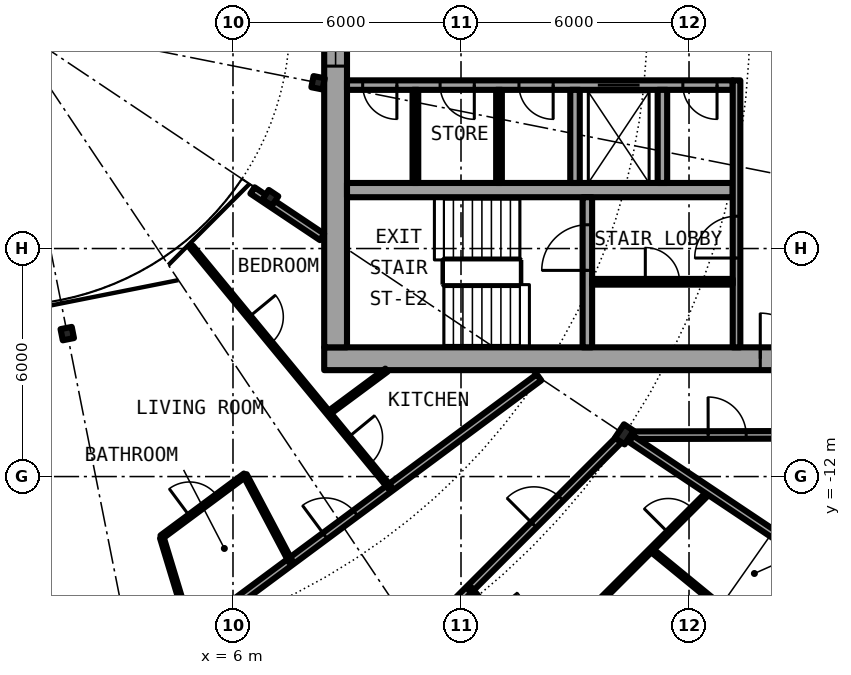
"""IFC4 building model, lengths in metres.
Left out: names, types, materials, properties, quantities, classifications, styles, units other than length and angle.
Written with IfcOpenShell. Run it as: python <this file> out.ifc"""

import sys

from ifc_helpers import new_model, si_unit, direction, frame, frame_2d, origin, origin_2d, place, context, subcontext, project, spatial, rectangle, i_section, extrude, element, fill, save


model = new_model("IFC4")
c1 = context("Model", 3, precision=1e-05, world=origin(), true_north=direction((0.0, 1.0)))
c2 = subcontext(c1, "Body", "Model", "MODEL_VIEW")
j1 = project(units=[si_unit("LENGTHUNIT", "METRE"), si_unit("PLANEANGLEUNIT", "RADIAN")], contexts=[c1])
p1 = place(None, origin())
s1 = spatial("IfcSite", under=j1, at=p1, CompositionType="ELEMENT")
p2 = place(p1, origin())
s2 = spatial("IfcBuilding", under=s1, at=p2, CompositionType="ELEMENT")
p3 = place(p2, frame((0.0, 0.0, 117.75)))
s3 = spatial("IfcBuildingStorey", under=s2, at=p3, CompositionType="ELEMENT", Elevation=117.75)
p4 = place(p3, frame((16.297, -10.889, 0.0), z_axis=(0.0, 0.0, 1.0), x_axis=(0.831469612303, -0.55557023302, 0.0)))
e1 = element("IfcColumn", 1, at=p4, inside=s3, PredefinedType="COLUMN", context=c2, shape_type="SweptSolid", body=[
    extrude(i_section(OverallWidth=0.307, OverallDepth=0.432, WebThickness=0.021, FlangeThickness=0.04, FilletRadius=0.027, at=origin_2d()), origin(), (0.0, 0.0, 1.0), 3.05),
])
for number, where, z_axis, x_axis in (
    (2, (1.639, -8.239, 0.0), (0.0, 0.0, 1.0), (0.195, -0.981, 0.0)),
    (3, (6.984, -4.667, 0.0), (0.0, 0.0, 1.0), (0.831, -0.556, 0.0)),
    (4, (8.239, -1.639, 0.0), (0.0, 0.0, 1.0), (0.981, -0.195, 0.0)),
):
    element("IfcColumn", number, at=place(p3, frame(where, z_axis=z_axis, x_axis=x_axis)), inside=s3, PredefinedType="COLUMN", context=c2, shape_type="SweptSolid", body=[
        extrude(i_section(OverallWidth=0.3, OverallDepth=0.3, WebThickness=0.011, FlangeThickness=0.019, FilletRadius=0.027, at=origin_2d()), origin(), (0.0, 0.0, 1.0), 3.05),
    ])
p5 = place(p3, frame((19.304, -19.304, 0.0), z_axis=(0.0, 0.0, 1.0), x_axis=(0.634382322723, 0.773019449054, 0.0)))
e5 = element("IfcWall", 5, at=p5, inside=s3, PredefinedType="SOLIDWALL", context=c2, shape_type="SweptSolid", body=[
    extrude(rectangle(XDim=5.352, YDim=0.25, at=frame_2d((2.676, 0.0))), origin(), (0.0, 0.0, 1.0), 2.7),
])
p6 = place(p5, frame((0.441, 0.0, 0.3)))
e6 = element("IfcOpeningElement", 6, at=p6, cuts=e5, PredefinedType="OPENING", context=c2, shape_type="SweptSolid", body=[
    extrude(rectangle(XDim=1.8, YDim=2.1, at=frame_2d((0.9, 1.05))), frame((0.0, 0.135, 0.0), z_axis=(0.0, -1.0, 0.0), x_axis=(1.0, 0.0, 0.0)), (0.0, 0.0, 1.0), 0.27),
])
p7 = place(p5, frame((3.51, 0.0, 0.0)))
e7 = element("IfcOpeningElement", 7, at=p7, cuts=e5, PredefinedType="OPENING", context=c2, shape_type="SweptSolid", body=[
    extrude(rectangle(XDim=1.0, YDim=2.2, at=frame_2d((0.5, 1.1))), frame((0.0, 0.135, 0.0), z_axis=(0.0, -1.0, 0.0), x_axis=(1.0, 0.0, 0.0)), (0.0, 0.0, 1.0), 0.27),
])
p8 = place(p3, frame((8.4, -8.9, 0.0), z_axis=(0.0, 0.0, 1.0), x_axis=(1.0, 0.0, 0.0)))
e8 = element("IfcWall", 8, at=p8, inside=s3, PredefinedType="SHEAR", context=c2, shape_type="SweptSolid", body=[
    extrude(rectangle(XDim=13.8, YDim=0.6, at=frame_2d((6.9, 0.0))), origin(), (0.0, 0.0, 1.0), 3.05),
])
p9 = place(p8, frame((11.475, 0.0, 0.0)))
e9 = element("IfcOpeningElement", 9, at=p9, cuts=e8, PredefinedType="OPENING", context=c2, shape_type="SweptSolid", body=[
    extrude(rectangle(XDim=1.2, YDim=2.3, at=frame_2d((0.6, 1.15))), frame((0.0, 0.31, 0.0), z_axis=(0.0, -1.0, 0.0), x_axis=(1.0, 0.0, 0.0)), (0.0, 0.0, 1.0), 0.62),
])
p10 = place(p3, frame((8.7, -8.6, 0.0), z_axis=(0.0, 0.0, 1.0), x_axis=(0.0, 1.0, 0.0)))
e10 = element("IfcWall", 10, at=p10, inside=s3, PredefinedType="SHEAR", context=c2, shape_type="SweptSolid", body=[
    extrude(rectangle(XDim=17.2, YDim=0.6, at=frame_2d((8.6, 0.0))), origin(), (0.0, 0.0, 1.0), 3.05),
])
p11 = place(p10, frame((7.4, 0.0, 0.1)))
e11 = element("IfcOpeningElement", 11, at=p11, cuts=e10, PredefinedType="OPENING", context=c2, shape_type="SweptSolid", body=[
    extrude(rectangle(XDim=2.4, YDim=2.2, at=frame_2d((1.2, 1.1))), frame((0.0, 0.31, 0.0), z_axis=(0.0, -1.0, 0.0), x_axis=(1.0, 0.0, 0.0)), (0.0, 0.0, 1.0), 0.62),
])
p12 = place(p3, frame((19.15, -1.7, 0.0), z_axis=(0.0, 0.0, 1.0), x_axis=(-1.0, 0.0, 0.0)))
e12 = element("IfcWall", 12, at=p12, inside=s3, PredefinedType="SHEAR", context=c2, shape_type="SweptSolid", body=[
    extrude(rectangle(XDim=10.15, YDim=0.25, at=frame_2d((5.075, 0.0))), origin(), (0.0, 0.0, 1.0), 3.05),
])
p13 = place(p12, frame((2.45, 0.0, 0.0)))
e13 = element("IfcOpeningElement", 13, at=p13, cuts=e12, PredefinedType="OPENING", context=c2, shape_type="SweptSolid", body=[
    extrude(rectangle(XDim=1.1, YDim=2.3, at=frame_2d((0.55, 1.15))), frame((0.0, 0.135, 0.0), z_axis=(0.0, -1.0, 0.0), x_axis=(1.0, 0.0, 0.0)), (0.0, 0.0, 1.0), 0.27),
])
p14 = place(p12, frame((8.837, 0.0, 0.0)))
e14 = element("IfcOpeningElement", 14, at=p14, cuts=e12, PredefinedType="OPENING", context=c2, shape_type="SweptSolid", body=[
    extrude(rectangle(XDim=0.9, YDim=2.3, at=frame_2d((0.45, 1.15))), frame((0.0, 0.135, 0.0), z_axis=(0.0, -1.0, 0.0), x_axis=(1.0, 0.0, 0.0)), (0.0, 0.0, 1.0), 0.27),
])
p15 = place(p12, frame((6.8, 0.0, 0.0)))
e15 = element("IfcOpeningElement", 15, at=p15, cuts=e12, PredefinedType="OPENING", context=c2, shape_type="SweptSolid", body=[
    extrude(rectangle(XDim=0.9, YDim=2.3, at=frame_2d((0.45, 1.15))), frame((0.0, 0.135, 0.0), z_axis=(0.0, -1.0, 0.0), x_axis=(1.0, 0.0, 0.0)), (0.0, 0.0, 1.0), 0.27),
])
p16 = place(p12, frame((4.725, 0.0, 0.0)))
e16 = element("IfcOpeningElement", 16, at=p16, cuts=e12, PredefinedType="OPENING", context=c2, shape_type="SweptSolid", body=[
    extrude(rectangle(XDim=0.9, YDim=2.3, at=frame_2d((0.45, 1.15))), frame((0.0, 0.135, 0.0), z_axis=(0.0, -1.0, 0.0), x_axis=(1.0, 0.0, 0.0)), (0.0, 0.0, 1.0), 0.27),
])
p17 = place(p12, frame((0.413, 0.0, 0.0)))
e17 = element("IfcOpeningElement", 17, at=p17, cuts=e12, PredefinedType="OPENING", context=c2, shape_type="SweptSolid", body=[
    extrude(rectangle(XDim=0.9, YDim=2.3, at=frame_2d((0.45, 1.15))), frame((0.0, 0.135, 0.0), z_axis=(0.0, -1.0, 0.0), x_axis=(1.0, 0.0, 0.0)), (0.0, 0.0, 1.0), 0.27),
])
p18 = place(p3, frame((9.0, -4.462, 0.0), z_axis=(0.0, 0.0, 1.0), x_axis=(1.0, 0.0, 0.0)))
e18 = element("IfcWall", 18, at=p18, inside=s3, PredefinedType="SHEAR", context=c2, shape_type="SweptSolid", body=[
    extrude(rectangle(XDim=10.15, YDim=0.375, at=frame_2d((5.075, 0.0))), origin(), (0.0, 0.0, 1.0), 3.05),
])
p19 = place(p3, frame((15.325, -8.6, 0.0), z_axis=(0.0, 0.0, 1.0), x_axis=(0.0, 1.0, 0.0)))
e19 = element("IfcWall", 19, at=p19, inside=s3, PredefinedType="SHEAR", context=c2, shape_type="SweptSolid", body=[
    extrude(rectangle(XDim=3.95, YDim=0.25, at=frame_2d((1.975, 0.0))), origin(), (0.0, 0.0, 1.0), 3.05),
])
p20 = place(p19, frame((2.025, 0.0, 0.0)))
e20 = element("IfcOpeningElement", 20, at=p20, cuts=e19, PredefinedType="OPENING", context=c2, shape_type="SweptSolid", body=[
    extrude(rectangle(XDim=1.2, YDim=2.3, at=frame_2d((0.6, 1.15))), frame((0.0, 0.135, 0.0), z_axis=(0.0, -1.0, 0.0), x_axis=(1.0, 0.0, 0.0)), (0.0, 0.0, 1.0), 0.27),
])
for number, where, z_axis, x_axis in (
    (21, (15.0, -1.825, 0.0), (0.0, 0.0, 1.0), (0.0, -1.0, 0.0)),
    (22, (17.3, -1.825, 0.0), (0.0, 0.0, 1.0), (0.0, -1.0, 0.0)),
):
    element("IfcWall", number, at=place(p3, frame(where, z_axis=z_axis, x_axis=x_axis)), inside=s3, PredefinedType="SOLIDWALL", context=c2, shape_type="SweptSolid", body=[
        extrude(rectangle(XDim=2.45, YDim=0.25, at=frame_2d((1.225, 0.0))), origin(), (0.0, 0.0, 1.0), 2.7),
    ])
p21 = place(p3, frame((19.25, -8.6, 0.0), z_axis=(0.0, 0.0, 1.0), x_axis=(0.0, 1.0, 0.0)))
e23 = element("IfcWall", 23, at=p21, inside=s3, PredefinedType="SOLIDWALL", context=c2, shape_type="SweptSolid", body=[
    extrude(rectangle(XDim=7.025, YDim=0.2, at=frame_2d((3.513, 0.0))), origin(), (0.0, 0.0, 1.0), 2.7),
])
p22 = place(p21, frame((2.35, 0.0, 0.0)))
e24 = element("IfcOpeningElement", 24, at=p22, cuts=e23, PredefinedType="OPENING", context=c2, shape_type="SweptSolid", body=[
    extrude(rectangle(XDim=1.1, YDim=2.3, at=frame_2d((0.55, 1.15))), frame((0.0, 0.11, 0.0), z_axis=(0.0, -1.0, 0.0), x_axis=(1.0, 0.0, 0.0)), (0.0, 0.0, 1.0), 0.22),
])
for number, where, z_axis, x_axis in (
    (25, (10.8, -1.825, 0.0), (0.0, 0.0, 1.0), (0.0, -1.0, 0.0)),
    (26, (13.0, -1.825, 0.0), (0.0, 0.0, 1.0), (0.0, -1.0, 0.0)),
):
    element("IfcWall", number, at=place(p3, frame(where, z_axis=z_axis, x_axis=x_axis)), inside=s3, PredefinedType="PARTITIONING", context=c2, shape_type="SweptSolid", body=[
        extrude(rectangle(XDim=2.45, YDim=0.15, at=frame_2d((1.225, 0.0))), origin(), (0.0, 0.0, 1.0), 2.7),
    ])
p23 = place(p3, frame((15.45, -6.875, 0.0), z_axis=(0.0, 0.0, 1.0), x_axis=(1.0, 0.0, 0.0)))
e27 = element("IfcWall", 27, at=p23, inside=s3, PredefinedType="PARTITIONING", context=c2, shape_type="SweptSolid", body=[
    extrude(rectangle(XDim=3.7, YDim=0.15, at=frame_2d((1.85, 0.0))), origin(), (0.0, 0.0, 1.0), 2.7),
])
p24 = place(p23, frame((1.4, 0.0, 0.0)))
e28 = element("IfcOpeningElement", 28, at=p24, cuts=e27, PredefinedType="OPENING", context=c2, shape_type="SweptSolid", body=[
    extrude(rectangle(XDim=0.9, YDim=2.3, at=frame_2d((0.45, 1.15))), frame((0.0, 0.085, 0.0), z_axis=(0.0, -1.0, 0.0), x_axis=(1.0, 0.0, 0.0)), (0.0, 0.0, 1.0), 0.17),
])
p25 = place(p3, frame((15.468, -15.463, 0.0), z_axis=(0.0, 0.0, 1.0), x_axis=(0.707106781187, 0.707106781187, 0.0)))
e29 = element("IfcWall", 29, at=p25, inside=s3, PredefinedType="PARTITIONING", context=c2, shape_type="SweptSolid", body=[
    extrude(rectangle(XDim=4.351, YDim=0.1, at=frame_2d((2.176, 0.0))), origin(), (0.0, 0.0, 1.0), 2.7),
])
p26 = place(p25, frame((2.808, 0.0, 0.0)))
e30 = element("IfcOpeningElement", 30, at=p26, cuts=e29, PredefinedType="OPENING", context=c2, shape_type="SweptSolid", body=[
    extrude(rectangle(XDim=0.9, YDim=2.3, at=frame_2d((0.45, 1.15))), frame((0.0, 0.06, 0.0), z_axis=(0.0, -1.0, 0.0), x_axis=(1.0, 0.0, 0.0)), (0.0, 0.0, 1.0), 0.12),
])
p27 = place(p3, frame((11.0, -16.186, 0.0), z_axis=(0.0, 0.0, 1.0), x_axis=(0.707106781187, 0.707106781187, 0.0)))
e31 = element("IfcWall", 31, at=p27, inside=s3, PredefinedType="PARTITIONING", context=c2, shape_type="SweptSolid", body=[
    extrude(rectangle(XDim=7.334, YDim=0.2, at=frame_2d((3.667, 0.0))), origin(), (0.0, 0.0, 1.0), 2.39),
])
p28 = place(p27, frame((4.123, 0.0, 0.0)))
e32 = element("IfcOpeningElement", 32, at=p28, cuts=e31, PredefinedType="OPENING", context=c2, shape_type="SweptSolid", body=[
    extrude(rectangle(XDim=1.0, YDim=2.3, at=frame_2d((0.5, 1.15))), frame((0.0, 0.11, 0.0), z_axis=(0.0, -1.0, 0.0), x_axis=(1.0, 0.0, 0.0)), (0.0, 0.0, 1.0), 0.22),
])
p29 = place(p3, frame((4.906, -16.172, 0.0), z_axis=(0.0, 0.0, 1.0), x_axis=(0.803204584823, 0.59570327758, 0.0)))
e33 = element("IfcWall", 33, at=p29, inside=s3, PredefinedType="PARTITIONING", context=c2, shape_type="SweptSolid", body=[
    extrude(rectangle(XDim=11.387, YDim=0.2, at=frame_2d((5.693, 0.0))), origin(), (0.0, 0.0, 1.0), 2.7),
])
p30 = place(p29, frame((4.38, 0.0, 0.0)))
e34 = element("IfcOpeningElement", 34, at=p30, cuts=e33, PredefinedType="OPENING", context=c2, shape_type="SweptSolid", body=[
    extrude(rectangle(XDim=1.0, YDim=2.3, at=frame_2d((0.5, 1.15))), frame((0.0, 0.11, 0.0), z_axis=(0.0, -1.0, 0.0), x_axis=(1.0, 0.0, 0.0)), (0.0, 0.0, 1.0), 0.22),
])
p31 = place(p3, frame((4.122, -13.589, 0.0), z_axis=(0.0, 0.0, 1.0), x_axis=(0.803128348509, 0.595806055542, 0.0)))
e35 = element("IfcWall", 35, at=p31, inside=s3, PredefinedType="PARTITIONING", context=c2, shape_type="SweptSolid", body=[
    extrude(rectangle(XDim=2.734, YDim=0.1, at=frame_2d((1.367, 0.0))), origin(), (0.0, 0.0, 1.0), 2.7),
])
p32 = place(p31, frame((0.917, 0.0, 0.0)))
e36 = element("IfcOpeningElement", 36, at=p32, cuts=e35, PredefinedType="OPENING", context=c2, shape_type="SweptSolid", body=[
    extrude(rectangle(XDim=0.9, YDim=2.3, at=frame_2d((0.45, 1.15))), frame((0.0, 0.06, 0.0), z_axis=(0.0, -1.0, 0.0), x_axis=(1.0, 0.0, 0.0)), (0.0, 0.0, 1.0), 0.12),
])
p33 = place(p3, frame((8.513, -10.332, 0.0), z_axis=(0.0, 0.0, 1.0), x_axis=(0.803149591038, 0.595777420196, 0.0)))
e37 = element("IfcWall", 37, at=p33, inside=s3, PredefinedType="PARTITIONING", context=c2, shape_type="SweptSolid", body=[
    extrude(rectangle(XDim=1.9, YDim=0.1, at=frame_2d((0.95, 0.0))), origin(), (0.0, 0.0, 1.0), 2.7),
])
p34 = place(p3, frame((16.541, -10.912, 0.0), z_axis=(0.0, 0.0, 1.0), x_axis=(0.999997173357, 0.002377662213, 0.0)))
e38 = element("IfcWall", 38, at=p34, inside=s3, PredefinedType="PARTITIONING", context=c2, shape_type="SweptSolid", body=[
    extrude(rectangle(XDim=5.134, YDim=0.2, at=frame_2d((2.567, 0.0))), origin(), (0.0, 0.0, 1.0), 2.7),
])
p35 = place(p34, frame((1.963, 0.0, 0.0)))
e39 = element("IfcOpeningElement", 39, at=p35, cuts=e38, PredefinedType="OPENING", context=c2, shape_type="SweptSolid", body=[
    extrude(rectangle(XDim=1.0, YDim=2.3, at=frame_2d((0.5, 1.15))), frame((0.0, 0.11, 0.0), z_axis=(0.0, -1.0, 0.0), x_axis=(1.0, 0.0, 0.0)), (0.0, 0.0, 1.0), 0.22),
])
p36 = place(p3, frame((6.513, -4.472, 0.0), z_axis=(0.0, 0.0, 1.0), x_axis=(0.831333375071, -0.555774072347, 0.0)))
e40 = element("IfcWall", 40, at=p36, inside=s3, PredefinedType="PARTITIONING", context=c2, shape_type="SweptSolid", body=[
    extrude(rectangle(XDim=2.203, YDim=0.2, at=frame_2d((1.101, 0.0))), origin(), (0.0, 0.0, 1.0), 2.7),
])
p37 = place(p3, frame((4.908, -5.959, 0.0), z_axis=(0.0, 0.0, 1.0), x_axis=(0.636105207978, -0.771602335652, 0.0)))
e41 = element("IfcWall", 41, at=p37, inside=s3, PredefinedType="PARTITIONING", context=c2, shape_type="SweptSolid", body=[
    extrude(rectangle(XDim=8.213, YDim=0.1, at=frame_2d((4.106, 0.0))), origin(), (0.0, 0.0, 1.0), 2.7),
])
p38 = place(p37, frame((6.49, 0.0, 0.0)))
e42 = element("IfcOpeningElement", 42, at=p38, cuts=e41, PredefinedType="OPENING", context=c2, shape_type="SweptSolid", body=[
    extrude(rectangle(XDim=0.9, YDim=2.3, at=frame_2d((0.45, 1.15))), frame((0.0, 0.06, 0.0), z_axis=(0.0, -1.0, 0.0), x_axis=(1.0, 0.0, 0.0)), (0.0, 0.0, 1.0), 0.12),
])
p39 = place(p37, frame((2.384, 0.0, 0.0)))
e43 = element("IfcOpeningElement", 43, at=p39, cuts=e41, PredefinedType="OPENING", context=c2, shape_type="SweptSolid", body=[
    extrude(rectangle(XDim=0.9, YDim=2.3, at=frame_2d((0.45, 1.15))), frame((0.0, 0.06, 0.0), z_axis=(0.0, -1.0, 0.0), x_axis=(1.0, 0.0, 0.0)), (0.0, 0.0, 1.0), 0.12),
])
p40 = place(p3, frame((6.316, -11.961, 0.0), z_axis=(0.0, 0.0, 1.0), x_axis=(0.467037016128, -0.884237765291, 0.0)))
e44 = element("IfcWall", 44, at=p40, inside=s3, PredefinedType="PARTITIONING", context=c2, shape_type="SweptSolid", body=[
    extrude(rectangle(XDim=2.572, YDim=0.1, at=frame_2d((1.286, 0.0))), origin(), (0.0, 0.0, 1.0), 2.7),
])
p41 = place(p3, frame((12.237, -14.948, 0.0), z_axis=(0.0, 0.0, 1.0), x_axis=(0.633537478353, -0.773712002958, 0.0)))
e45 = element("IfcWall", 45, at=p41, inside=s3, PredefinedType="PARTITIONING", context=c2, shape_type="SweptSolid", body=[
    extrude(rectangle(XDim=2.661, YDim=0.1, at=frame_2d((1.331, 0.0))), origin(), (0.0, 0.0, 1.0), 2.7),
])
p42 = place(p41, frame((0.881, 0.0, 0.0)))
e46 = element("IfcOpeningElement", 46, at=p42, cuts=e45, PredefinedType="OPENING", context=c2, shape_type="SweptSolid", body=[
    extrude(rectangle(XDim=0.9, YDim=2.3, at=frame_2d((0.45, 1.15))), frame((0.0, 0.06, 0.0), z_axis=(0.0, -1.0, 0.0), x_axis=(1.0, 0.0, 0.0)), (0.0, 0.0, 1.0), 0.12),
])
p43 = place(p3, frame((16.477, -11.009, 0.0), z_axis=(0.0, 0.0, 1.0), x_axis=(0.831467903109, -0.555572791, 0.0)))
e47 = element("IfcWall", 47, at=p43, inside=s3, PredefinedType="PARTITIONING", context=c2, shape_type="SweptSolid", body=[
    extrude(rectangle(XDim=7.358, YDim=0.2, at=frame_2d((3.679, 0.0))), origin(), (0.0, 0.0, 1.0), 2.7),
])
p44 = place(p3, frame((17.004, -13.927, 0.0), z_axis=(0.0, 0.0, 1.0), x_axis=(0.773517471898, -0.633774976367, 0.0)))
e48 = element("IfcWall", 48, at=p44, inside=s3, PredefinedType="PARTITIONING", context=c2, shape_type="SweptSolid", body=[
    extrude(rectangle(XDim=5.196, YDim=0.1, at=frame_2d((2.598, 0.0))), origin(), (0.0, 0.0, 1.0), 2.7),
])
p45 = place(p3, frame((4.9, -16.152, 0.0), z_axis=(0.0, 0.0, 1.0), x_axis=(-0.290456070925, 0.956888327269, 0.0)))
e49 = element("IfcWall", 49, at=p45, inside=s3, PredefinedType="PARTITIONING", context=c2, shape_type="SweptSolid", body=[
    extrude(rectangle(XDim=2.658, YDim=0.1, at=frame_2d((1.329, 0.0))), origin(), (0.0, 0.0, 1.0), 2.7),
])
p46 = place(p13, origin())
e50 = element("IfcDoor", 50, at=p46, inside=s3, OperationType="DOUBLE_DOOR_SLIDING", PredefinedType="DOOR", context=c2, shape_type="SweptSolid", body=[
    extrude(rectangle(XDim=1.1, YDim=2.3, at=frame_2d((0.55, 1.15))), frame((0.0, 0.025, 0.0), z_axis=(0.0, -1.0, 0.0), x_axis=(1.0, 0.0, 0.0)), (0.0, 0.0, 1.0), 0.05),
])
fill(e13, e50)
p47 = place(p14, origin())
e51 = element("IfcDoor", 51, at=p47, inside=s3, OperationType="SINGLE_SWING_LEFT", PredefinedType="DOOR", context=c2, shape_type="SweptSolid", body=[
    extrude(rectangle(XDim=0.9, YDim=2.3, at=frame_2d((0.45, 1.15))), frame((0.0, 0.025, 0.0), z_axis=(0.0, -1.0, 0.0), x_axis=(1.0, 0.0, 0.0)), (0.0, 0.0, 1.0), 0.05),
])
fill(e14, e51)
p48 = place(p15, origin())
e52 = element("IfcDoor", 52, at=p48, inside=s3, OperationType="SINGLE_SWING_LEFT", PredefinedType="DOOR", context=c2, shape_type="SweptSolid", body=[
    extrude(rectangle(XDim=0.9, YDim=2.3, at=frame_2d((0.45, 1.15))), frame((0.0, 0.025, 0.0), z_axis=(0.0, -1.0, 0.0), x_axis=(1.0, 0.0, 0.0)), (0.0, 0.0, 1.0), 0.05),
])
fill(e15, e52)
p49 = place(p16, origin())
e53 = element("IfcDoor", 53, at=p49, inside=s3, OperationType="SINGLE_SWING_LEFT", PredefinedType="DOOR", context=c2, shape_type="SweptSolid", body=[
    extrude(rectangle(XDim=0.9, YDim=2.3, at=frame_2d((0.45, 1.15))), frame((0.0, 0.025, 0.0), z_axis=(0.0, -1.0, 0.0), x_axis=(1.0, 0.0, 0.0)), (0.0, 0.0, 1.0), 0.05),
])
fill(e16, e53)
p50 = place(p17, origin())
e54 = element("IfcDoor", 54, at=p50, inside=s3, OperationType="SINGLE_SWING_RIGHT", PredefinedType="DOOR", context=c2, shape_type="SweptSolid", body=[
    extrude(rectangle(XDim=0.9, YDim=2.3, at=frame_2d((0.45, 1.15))), frame((0.0, 0.025, 0.0), z_axis=(0.0, -1.0, 0.0), x_axis=(1.0, 0.0, 0.0)), (0.0, 0.0, 1.0), 0.05),
])
fill(e17, e54)
p51 = place(p24, origin())
e55 = element("IfcDoor", 55, at=p51, inside=s3, OperationType="SINGLE_SWING_LEFT", PredefinedType="DOOR", context=c2, shape_type="SweptSolid", body=[
    extrude(rectangle(XDim=0.9, YDim=2.3, at=frame_2d((0.45, 1.15))), frame((0.0, 0.025, 0.0), z_axis=(0.0, -1.0, 0.0), x_axis=(1.0, 0.0, 0.0)), (0.0, 0.0, 1.0), 0.05),
])
fill(e28, e55)
p52 = place(p20, origin())
e56 = element("IfcDoor", 56, at=p52, inside=s3, OperationType="SINGLE_SWING_LEFT", PredefinedType="DOOR", context=c2, shape_type="SweptSolid", body=[
    extrude(rectangle(XDim=1.2, YDim=2.3, at=frame_2d((0.6, 1.15))), frame((0.0, 0.025, 0.0), z_axis=(0.0, -1.0, 0.0), x_axis=(1.0, 0.0, 0.0)), (0.0, 0.0, 1.0), 0.05),
])
fill(e20, e56)
p53 = place(p22, origin())
e57 = element("IfcDoor", 57, at=p53, inside=s3, OperationType="SINGLE_SWING_RIGHT", PredefinedType="DOOR", context=c2, shape_type="SweptSolid", body=[
    extrude(rectangle(XDim=1.1, YDim=2.3, at=frame_2d((0.55, 1.15))), frame((0.0, 0.025, 0.0), z_axis=(0.0, -1.0, 0.0), x_axis=(1.0, 0.0, 0.0)), (0.0, 0.0, 1.0), 0.05),
])
fill(e24, e57)
p54 = place(p9, origin())
e58 = element("IfcDoor", 58, at=p54, inside=s3, OperationType="SINGLE_SWING_LEFT", PredefinedType="DOOR", context=c2, shape_type="SweptSolid", body=[
    extrude(rectangle(XDim=1.2, YDim=2.3, at=frame_2d((0.6, 1.15))), frame((0.0, 0.025, 0.0), z_axis=(0.0, -1.0, 0.0), x_axis=(1.0, 0.0, 0.0)), (0.0, 0.0, 1.0), 0.05),
])
fill(e9, e58)
p55 = place(p11, origin())
e59 = element("IfcWindow", 59, at=p55, inside=s3, PartitioningType="SINGLE_PANEL", PredefinedType="WINDOW", context=c2, shape_type="SweptSolid", body=[
    extrude(rectangle(XDim=2.4, YDim=2.2, at=frame_2d((1.2, 1.1))), frame((0.0, 0.03, 0.0), z_axis=(0.0, -1.0, 0.0), x_axis=(1.0, 0.0, 0.0)), (0.0, 0.0, 1.0), 0.06),
])
fill(e11, e59)
p56 = place(p28, origin())
e60 = element("IfcDoor", 60, at=p56, inside=s3, OperationType="SINGLE_SWING_RIGHT", PredefinedType="DOOR", context=c2, shape_type="SweptSolid", body=[
    extrude(rectangle(XDim=1.0, YDim=2.3, at=frame_2d((0.5, 1.15))), frame((0.0, 0.025, 0.0), z_axis=(0.0, -1.0, 0.0), x_axis=(1.0, 0.0, 0.0)), (0.0, 0.0, 1.0), 0.05),
])
fill(e32, e60)
p57 = place(p26, origin())
e61 = element("IfcDoor", 61, at=p57, inside=s3, OperationType="SINGLE_SWING_RIGHT", PredefinedType="DOOR", context=c2, shape_type="SweptSolid", body=[
    extrude(rectangle(XDim=0.9, YDim=2.3, at=frame_2d((0.45, 1.15))), frame((0.0, 0.025, 0.0), z_axis=(0.0, -1.0, 0.0), x_axis=(1.0, 0.0, 0.0)), (0.0, 0.0, 1.0), 0.05),
])
fill(e30, e61)
p58 = place(p30, origin())
e62 = element("IfcDoor", 62, at=p58, inside=s3, OperationType="SINGLE_SWING_LEFT", PredefinedType="DOOR", context=c2, shape_type="SweptSolid", body=[
    extrude(rectangle(XDim=1.0, YDim=2.3, at=frame_2d((0.5, 1.15))), frame((0.0, 0.025, 0.0), z_axis=(0.0, -1.0, 0.0), x_axis=(1.0, 0.0, 0.0)), (0.0, 0.0, 1.0), 0.05),
])
fill(e34, e62)
p59 = place(p32, origin())
e63 = element("IfcDoor", 63, at=p59, inside=s3, OperationType="SINGLE_SWING_RIGHT", PredefinedType="DOOR", context=c2, shape_type="SweptSolid", body=[
    extrude(rectangle(XDim=0.9, YDim=2.3, at=frame_2d((0.45, 1.15))), frame((0.0, 0.025, 0.0), z_axis=(0.0, -1.0, 0.0), x_axis=(1.0, 0.0, 0.0)), (0.0, 0.0, 1.0), 0.05),
])
fill(e36, e63)
p60 = place(p38, origin())
e64 = element("IfcDoor", 64, at=p60, inside=s3, OperationType="SINGLE_SWING_RIGHT", PredefinedType="DOOR", context=c2, shape_type="SweptSolid", body=[
    extrude(rectangle(XDim=0.9, YDim=2.3, at=frame_2d((0.45, 1.15))), frame((0.0, 0.025, 0.0), z_axis=(0.0, -1.0, 0.0), x_axis=(1.0, 0.0, 0.0)), (0.0, 0.0, 1.0), 0.05),
])
fill(e42, e64)
p61 = place(p39, origin())
e65 = element("IfcDoor", 65, at=p61, inside=s3, OperationType="SINGLE_SWING_LEFT", PredefinedType="DOOR", context=c2, shape_type="SweptSolid", body=[
    extrude(rectangle(XDim=0.9, YDim=2.3, at=frame_2d((0.45, 1.15))), frame((0.0, 0.025, 0.0), z_axis=(0.0, -1.0, 0.0), x_axis=(1.0, 0.0, 0.0)), (0.0, 0.0, 1.0), 0.05),
])
fill(e43, e65)
p62 = place(p35, origin())
e66 = element("IfcDoor", 66, at=p62, inside=s3, OperationType="SINGLE_SWING_LEFT", PredefinedType="DOOR", context=c2, shape_type="SweptSolid", body=[
    extrude(rectangle(XDim=1.0, YDim=2.3, at=frame_2d((0.5, 1.15))), frame((0.0, 0.025, 0.0), z_axis=(0.0, -1.0, 0.0), x_axis=(1.0, 0.0, 0.0)), (0.0, 0.0, 1.0), 0.05),
])
fill(e39, e66)
save(model, sys.argv[1])
